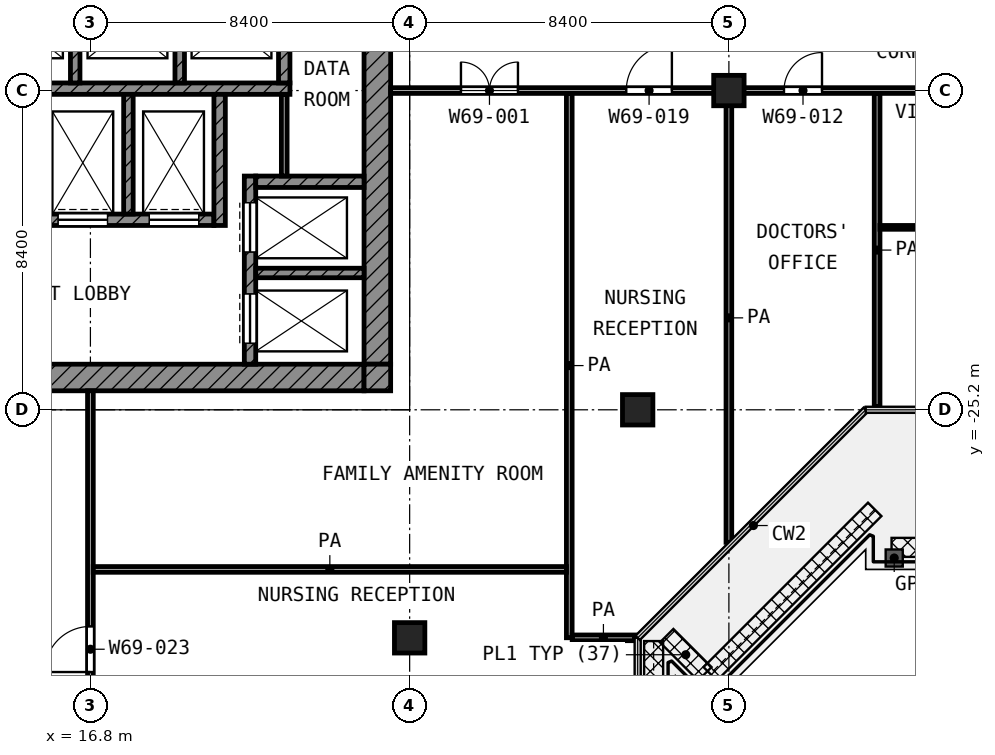
"""IFC4 building model, lengths in metres.
Left out: names, types, materials, properties, quantities, classifications, styles, units other than length and angle.
Written with IfcOpenShell. Run it as: python <this file> out.ifc"""

import sys

from ifc_helpers import new_model, si_unit, direction, frame, frame_2d, origin, origin_2d, place, context, subcontext, project, spatial, rectangle, extrude, element, fill, save


model = new_model("IFC4")
c1 = context("Model", 3, precision=1e-05, world=origin(), true_north=direction((0.0, 1.0)))
c2 = subcontext(c1, "Body", "Model", "MODEL_VIEW")
j1 = project(units=[si_unit("LENGTHUNIT", "METRE"), si_unit("PLANEANGLEUNIT", "RADIAN")], contexts=[c1])
p1 = place(None, origin())
s1 = spatial("IfcSite", under=j1, at=p1, CompositionType="ELEMENT")
p2 = place(p1, origin())
s2 = spatial("IfcBuilding", under=s1, at=p2, CompositionType="ELEMENT")
p3 = place(p2, frame((0.0, 0.0, 319.6)))
s3 = spatial("IfcBuildingStorey", under=s2, at=p3, CompositionType="ELEMENT", Elevation=319.6)
for number, where, z_axis, x_axis in (
    (1, (33.6, -16.8, 0.0), (0.0, 0.0, 1.0), (1.0, 0.0, 0.0)),
    (2, (31.2, -25.2, 0.0), (0.0, 0.0, 1.0), (1.0, 0.0, 0.0)),
    (3, (25.2, -31.2, 0.0), (0.0, 0.0, 1.0), (1.0, 0.0, 0.0)),
):
    element("IfcColumn", number, at=place(p3, frame(where, z_axis=z_axis, x_axis=x_axis)), inside=s3, PredefinedType="COLUMN", context=c2, shape_type="SweptSolid", body=[
        extrude(rectangle(XDim=0.8, YDim=0.8, at=origin_2d()), origin(), (0.0, 0.0, 1.0), 4.2),
    ])
p4 = place(p3, frame((24.35, -24.0, 0.0), z_axis=(0.0, 0.0, 1.0), x_axis=(0.0, 1.0, 0.0)))
e4 = element("IfcWall", 4, at=p4, inside=s3, PredefinedType="SHEAR", context=c2, shape_type="SweptSolid", body=[
    extrude(rectangle(XDim=18.6, YDim=0.7, at=frame_2d((9.3, 0.0))), origin(), (0.0, 0.0, 1.0), 3.6),
])
p5 = place(p4, frame((10.5, 0.0, 0.0)))
e5 = element("IfcOpeningElement", 5, at=p5, cuts=e4, PredefinedType="OPENING", context=c2, shape_type="SweptSolid", body=[
    extrude(rectangle(XDim=1.8, YDim=2.1, at=frame_2d((0.9, 1.05))), frame((0.0, 0.36, 0.0), z_axis=(0.0, -1.0, 0.0), x_axis=(1.0, 0.0, 0.0)), (0.0, 0.0, 1.0), 0.72),
])
p6 = place(p3, frame((5.4, -24.35, 0.0), z_axis=(0.0, 0.0, 1.0), x_axis=(1.0, 0.0, 0.0)))
e6 = element("IfcWall", 6, at=p6, inside=s3, PredefinedType="SHEAR", context=c2, shape_type="SweptSolid", body=[
    extrude(rectangle(XDim=18.6, YDim=0.7, at=frame_2d((9.3, 0.0))), origin(), (0.0, 0.0, 1.0), 3.6),
])
p7 = place(p6, frame((6.3, 0.0, 0.0)))
e7 = element("IfcOpeningElement", 7, at=p7, cuts=e6, PredefinedType="OPENING", context=c2, shape_type="SweptSolid", body=[
    extrude(rectangle(XDim=1.8, YDim=2.1, at=frame_2d((0.9, 1.05))), frame((0.0, 0.36, 0.0), z_axis=(0.0, -1.0, 0.0), x_axis=(1.0, 0.0, 0.0)), (0.0, 0.0, 1.0), 0.72),
])
p8 = place(p3, frame((24.35, -24.7, 0.0), z_axis=(0.0, 0.0, 1.0), x_axis=(0.0, 1.0, 0.0)))
e8 = element("IfcWall", 8, at=p8, inside=s3, PredefinedType="SHEAR", context=c2, shape_type="SweptSolid", body=[
    extrude(rectangle(XDim=0.7, YDim=0.7, at=frame_2d((0.35, 0.0))), origin(), (0.0, 0.0, 1.0), 3.6),
])
p9 = place(p3, frame((5.4, -16.75, 0.0), z_axis=(0.0, 0.0, 1.0), x_axis=(1.0, 0.0, 0.0)))
e9 = element("IfcWall", 9, at=p9, inside=s3, PredefinedType="SHEAR", context=c2, shape_type="SweptSolid", body=[
    extrude(rectangle(XDim=16.65, YDim=0.3, at=frame_2d((8.325, 0.0))), origin(), (0.0, 0.0, 1.0), 3.6),
])
p10 = place(p3, frame((5.4, -20.2, 0.0), z_axis=(0.0, 0.0, 1.0), x_axis=(1.0, 0.0, 0.0)))
e10 = element("IfcWall", 10, at=p10, inside=s3, PredefinedType="SHEAR", context=c2, shape_type="SweptSolid", body=[
    extrude(rectangle(XDim=14.65, YDim=0.3, at=frame_2d((7.325, 0.0))), origin(), (0.0, 0.0, 1.0), 3.6),
])
p11 = place(p10, frame((10.55, 0.0, 0.0)))
e11 = element("IfcOpeningElement", 11, at=p11, cuts=e10, PredefinedType="OPENING", context=c2, shape_type="SweptSolid", body=[
    extrude(rectangle(XDim=1.3, YDim=2.1, at=frame_2d((0.65, 1.05))), frame((0.0, 0.16, 0.0), z_axis=(0.0, -1.0, 0.0), x_axis=(1.0, 0.0, 0.0)), (0.0, 0.0, 1.0), 0.32),
])
p12 = place(p10, frame((12.95, 0.0, 0.0)))
e12 = element("IfcOpeningElement", 12, at=p12, cuts=e10, PredefinedType="OPENING", context=c2, shape_type="SweptSolid", body=[
    extrude(rectangle(XDim=1.3, YDim=2.1, at=frame_2d((0.65, 1.05))), frame((0.0, 0.16, 0.0), z_axis=(0.0, -1.0, 0.0), x_axis=(1.0, 0.0, 0.0)), (0.0, 0.0, 1.0), 0.32),
])
p13 = place(p10, frame((0.55, 0.0, 0.0)))
e13 = element("IfcOpeningElement", 13, at=p13, cuts=e10, PredefinedType="OPENING", context=c2, shape_type="SweptSolid", body=[
    extrude(rectangle(XDim=1.3, YDim=2.1, at=frame_2d((0.65, 1.05))), frame((0.0, 0.16, 0.0), z_axis=(0.0, -1.0, 0.0), x_axis=(1.0, 0.0, 0.0)), (0.0, 0.0, 1.0), 0.32),
])
p14 = place(p10, frame((2.95, 0.0, 0.0)))
e14 = element("IfcOpeningElement", 14, at=p14, cuts=e10, PredefinedType="OPENING", context=c2, shape_type="SweptSolid", body=[
    extrude(rectangle(XDim=1.3, YDim=2.1, at=frame_2d((0.65, 1.05))), frame((0.0, 0.16, 0.0), z_axis=(0.0, -1.0, 0.0), x_axis=(1.0, 0.0, 0.0)), (0.0, 0.0, 1.0), 0.32),
])
p15 = place(p10, frame((5.35, 0.0, 0.0)))
e15 = element("IfcOpeningElement", 15, at=p15, cuts=e10, PredefinedType="OPENING", context=c2, shape_type="SweptSolid", body=[
    extrude(rectangle(XDim=0.9, YDim=2.1, at=frame_2d((0.45, 1.05))), frame((0.0, 0.16, 0.0), z_axis=(0.0, -1.0, 0.0), x_axis=(1.0, 0.0, 0.0)), (0.0, 0.0, 1.0), 0.32),
])
p16 = place(p10, frame((7.75, 0.0, 0.0)))
e16 = element("IfcOpeningElement", 16, at=p16, cuts=e10, PredefinedType="OPENING", context=c2, shape_type="SweptSolid", body=[
    extrude(rectangle(XDim=0.9, YDim=2.1, at=frame_2d((0.45, 1.05))), frame((0.0, 0.16, 0.0), z_axis=(0.0, -1.0, 0.0), x_axis=(1.0, 0.0, 0.0)), (0.0, 0.0, 1.0), 0.32),
])
p17 = place(p3, frame((20.2, -20.35, 0.0), z_axis=(0.0, 0.0, 1.0), x_axis=(0.0, 1.0, 0.0)))
e17 = element("IfcWall", 17, at=p17, inside=s3, PredefinedType="SHEAR", context=c2, shape_type="SweptSolid", body=[
    extrude(rectangle(XDim=3.45, YDim=0.3, at=frame_2d((1.725, 0.0))), origin(), (0.0, 0.0, 1.0), 3.6),
])
p18 = place(p3, frame((21.9, -16.6, 0.0), z_axis=(0.0, 0.0, 1.0), x_axis=(0.0, 1.0, 0.0)))
e18 = element("IfcWall", 18, at=p18, inside=s3, PredefinedType="SHEAR", context=c2, shape_type="SweptSolid", body=[
    extrude(rectangle(XDim=2.35, YDim=0.3, at=frame_2d((1.175, 0.0))), origin(), (0.0, 0.0, 1.0), 3.6),
])
p19 = place(p3, frame((21.15, -19.2, 0.0), z_axis=(0.0, 0.0, 1.0), x_axis=(1.0, 0.0, 0.0)))
e19 = element("IfcWall", 19, at=p19, inside=s3, PredefinedType="SHEAR", context=c2, shape_type="SweptSolid", body=[
    extrude(rectangle(XDim=2.85, YDim=0.3, at=frame_2d((1.425, 0.0))), origin(), (0.0, 0.0, 1.0), 3.6),
])
p20 = place(p3, frame((21.0, -24.0, 0.0), z_axis=(0.0, 0.0, 1.0), x_axis=(0.0, 1.0, 0.0)))
e20 = element("IfcWall", 20, at=p20, inside=s3, PredefinedType="SHEAR", context=c2, shape_type="SweptSolid", body=[
    extrude(rectangle(XDim=4.95, YDim=0.3, at=frame_2d((2.475, 0.0))), origin(), (0.0, 0.0, 1.0), 3.6),
])
p21 = place(p20, frame((2.95, 0.0, 0.0)))
e21 = element("IfcOpeningElement", 21, at=p21, cuts=e20, PredefinedType="OPENING", context=c2, shape_type="SweptSolid", body=[
    extrude(rectangle(XDim=1.3, YDim=2.1, at=frame_2d((0.65, 1.05))), frame((0.0, 0.16, 0.0), z_axis=(0.0, -1.0, 0.0), x_axis=(1.0, 0.0, 0.0)), (0.0, 0.0, 1.0), 0.32),
])
p22 = place(p20, frame((0.55, 0.0, 0.0)))
e22 = element("IfcOpeningElement", 22, at=p22, cuts=e20, PredefinedType="OPENING", context=c2, shape_type="SweptSolid", body=[
    extrude(rectangle(XDim=1.3, YDim=2.1, at=frame_2d((0.65, 1.05))), frame((0.0, 0.16, 0.0), z_axis=(0.0, -1.0, 0.0), x_axis=(1.0, 0.0, 0.0)), (0.0, 0.0, 1.0), 0.32),
])
p23 = place(p3, frame((21.15, -21.6, 0.0), z_axis=(0.0, 0.0, 1.0), x_axis=(1.0, 0.0, 0.0)))
e23 = element("IfcWall", 23, at=p23, inside=s3, PredefinedType="SHEAR", context=c2, shape_type="SweptSolid", body=[
    extrude(rectangle(XDim=2.85, YDim=0.25, at=frame_2d((1.425, 0.0))), origin(), (0.0, 0.0, 1.0), 3.6),
])
p24 = place(p3, frame((17.8, -20.05, 0.0), z_axis=(0.0, 0.0, 1.0), x_axis=(0.0, 1.0, 0.0)))
e24 = element("IfcWall", 24, at=p24, inside=s3, PredefinedType="SHEAR", context=c2, shape_type="SweptSolid", body=[
    extrude(rectangle(XDim=3.15, YDim=0.25, at=frame_2d((1.575, 0.0))), origin(), (0.0, 0.0, 1.0), 3.6),
])
for number, where, z_axis, x_axis in (
    (25, (16.4, -16.6, 0.0), (0.0, 0.0, 1.0), (0.0, 1.0, 0.0)),
    (26, (19.15, -16.6, 0.0), (0.0, 0.0, 1.0), (0.0, 1.0, 0.0)),
):
    element("IfcWall", number, at=place(p3, frame(where, z_axis=z_axis, x_axis=x_axis)), inside=s3, PredefinedType="SHEAR", context=c2, shape_type="SweptSolid", body=[
        extrude(rectangle(XDim=2.35, YDim=0.25, at=frame_2d((1.175, 0.0))), origin(), (0.0, 0.0, 1.0), 3.6),
    ])
p25 = place(p3, frame((21.9, -19.05, 0.0), z_axis=(0.0, 0.0, 1.0), x_axis=(0.0, 1.0, 0.0)))
e27 = element("IfcWall", 27, at=p25, inside=s3, PredefinedType="PARTITIONING", context=c2, shape_type="SweptSolid", body=[
    extrude(rectangle(XDim=2.15, YDim=0.15, at=frame_2d((1.075, 0.0))), origin(), (0.0, 0.0, 1.0), 3.6),
])
p26 = place(p3, frame((37.575, -20.4, 0.0), z_axis=(0.0, 0.0, 1.0), x_axis=(1.0, 0.0, 0.0)))
e28 = element("IfcWall", 28, at=p26, inside=s3, PredefinedType="PARTITIONING", context=c2, shape_type="SweptSolid", body=[
    extrude(rectangle(XDim=8.55, YDim=0.1, at=frame_2d((4.275, 0.0))), origin(), (0.0, 0.0, 1.0), 3.6),
])
p27 = place(p26, frame((4.825, 0.0, 0.0)))
e29 = element("IfcOpeningElement", 29, at=p27, cuts=e28, PredefinedType="OPENING", context=c2, shape_type="SweptSolid", body=[
    extrude(rectangle(XDim=1.0, YDim=2.1, at=frame_2d((0.5, 1.05))), frame((0.0, 0.06, 0.0), z_axis=(0.0, -1.0, 0.0), x_axis=(1.0, 0.0, 0.0)), (0.0, 0.0, 1.0), 0.12),
])
p28 = place(p3, frame((29.477, -31.2, 0.0), z_axis=(0.0, 0.0, 1.0), x_axis=(1.0, 0.0, 0.0)))
e30 = element("IfcWall", 30, at=p28, inside=s3, PredefinedType="PARTITIONING", context=c2, shape_type="SweptSolid", body=[
    extrude(rectangle(XDim=1.643, YDim=0.15, at=frame_2d((0.822, 0.0))), origin(), (0.0, 0.0, 1.0), 3.6),
])
p29 = place(p3, frame((16.875, -29.4, 0.0), z_axis=(0.0, 0.0, 1.0), x_axis=(1.0, 0.0, 0.0)))
e31 = element("IfcWall", 31, at=p29, inside=s3, PredefinedType="PARTITIONING", context=c2, shape_type="SweptSolid", body=[
    extrude(rectangle(XDim=12.45, YDim=0.15, at=frame_2d((6.225, 0.0))), origin(), (0.0, 0.0, 1.0), 3.6),
])
p30 = place(p3, frame((24.7, -16.8, 0.0), z_axis=(0.0, 0.0, 1.0), x_axis=(1.0, 0.0, 0.0)))
e32 = element("IfcWall", 32, at=p30, inside=s3, PredefinedType="PARTITIONING", context=c2, shape_type="SweptSolid", body=[
    extrude(rectangle(XDim=34.02, YDim=0.15, at=frame_2d((17.01, 0.0))), origin(), (0.0, 0.0, 1.0), 3.6),
])
p31 = place(p30, frame((1.85, 0.0, 0.0)))
e33 = element("IfcOpeningElement", 33, at=p31, cuts=e32, PredefinedType="OPENING", context=c2, shape_type="SweptSolid", body=[
    extrude(rectangle(XDim=1.5, YDim=2.1, at=frame_2d((0.75, 1.05))), frame((0.0, 0.085, 0.0), z_axis=(0.0, -1.0, 0.0), x_axis=(1.0, 0.0, 0.0)), (0.0, 0.0, 1.0), 0.17),
])
p32 = place(p30, frame((6.2, 0.0, 0.0)))
e34 = element("IfcOpeningElement", 34, at=p32, cuts=e32, PredefinedType="OPENING", context=c2, shape_type="SweptSolid", body=[
    extrude(rectangle(XDim=1.2, YDim=2.1, at=frame_2d((0.6, 1.05))), frame((0.0, 0.085, 0.0), z_axis=(0.0, -1.0, 0.0), x_axis=(1.0, 0.0, 0.0)), (0.0, 0.0, 1.0), 0.17),
])
p33 = place(p30, frame((10.35, 0.0, 0.0)))
e35 = element("IfcOpeningElement", 35, at=p33, cuts=e32, PredefinedType="OPENING", context=c2, shape_type="SweptSolid", body=[
    extrude(rectangle(XDim=1.0, YDim=2.1, at=frame_2d((0.5, 1.05))), frame((0.0, 0.085, 0.0), z_axis=(0.0, -1.0, 0.0), x_axis=(1.0, 0.0, 0.0)), (0.0, 0.0, 1.0), 0.17),
])
p34 = place(p30, frame((20.0, 0.0, 0.0)))
e36 = element("IfcOpeningElement", 36, at=p34, cuts=e32, PredefinedType="OPENING", context=c2, shape_type="SweptSolid", body=[
    extrude(rectangle(XDim=1.2, YDim=2.1, at=frame_2d((0.6, 1.05))), frame((0.0, 0.085, 0.0), z_axis=(0.0, -1.0, 0.0), x_axis=(1.0, 0.0, 0.0)), (0.0, 0.0, 1.0), 0.17),
])
p35 = place(p30, frame((18.4, 0.0, 0.0)))
e37 = element("IfcOpeningElement", 37, at=p35, cuts=e32, PredefinedType="OPENING", context=c2, shape_type="SweptSolid", body=[
    extrude(rectangle(XDim=1.2, YDim=2.1, at=frame_2d((0.6, 1.05))), frame((0.0, 0.085, 0.0), z_axis=(0.0, -1.0, 0.0), x_axis=(1.0, 0.0, 0.0)), (0.0, 0.0, 1.0), 0.17),
])
p36 = place(p30, frame((23.1, 0.0, 0.0)))
e38 = element("IfcOpeningElement", 38, at=p36, cuts=e32, PredefinedType="OPENING", context=c2, shape_type="SweptSolid", body=[
    extrude(rectangle(XDim=1.0, YDim=2.1, at=frame_2d((0.5, 1.05))), frame((0.0, 0.085, 0.0), z_axis=(0.0, -1.0, 0.0), x_axis=(1.0, 0.0, 0.0)), (0.0, 0.0, 1.0), 0.17),
])
p37 = place(p30, frame((29.15, 0.0, 0.0)))
e39 = element("IfcOpeningElement", 39, at=p37, cuts=e32, PredefinedType="OPENING", context=c2, shape_type="SweptSolid", body=[
    extrude(rectangle(XDim=1.5, YDim=2.1, at=frame_2d((0.75, 1.05))), frame((0.0, 0.085, 0.0), z_axis=(0.0, -1.0, 0.0), x_axis=(1.0, 0.0, 0.0)), (0.0, 0.0, 1.0), 0.17),
])
p38 = place(p3, frame((16.8, -41.92, 0.0), z_axis=(0.0, 0.0, 1.0), x_axis=(0.0, 1.0, 0.0)))
e40 = element("IfcWall", 40, at=p38, inside=s3, PredefinedType="PARTITIONING", context=c2, shape_type="SweptSolid", body=[
    extrude(rectangle(XDim=17.22, YDim=0.15, at=frame_2d((8.61, 0.0))), origin(), (0.0, 0.0, 1.0), 3.6),
])
p39 = place(p38, frame((9.82, 0.0, 0.0)))
e41 = element("IfcOpeningElement", 41, at=p39, cuts=e40, PredefinedType="OPENING", context=c2, shape_type="SweptSolid", body=[
    extrude(rectangle(XDim=1.2, YDim=2.1, at=frame_2d((0.6, 1.05))), frame((0.0, 0.085, 0.0), z_axis=(0.0, -1.0, 0.0), x_axis=(1.0, 0.0, 0.0)), (0.0, 0.0, 1.0), 0.17),
])
p40 = place(p38, frame((5.87, 0.0, 0.0)))
e42 = element("IfcOpeningElement", 42, at=p40, cuts=e40, PredefinedType="OPENING", context=c2, shape_type="SweptSolid", body=[
    extrude(rectangle(XDim=1.0, YDim=2.1, at=frame_2d((0.5, 1.05))), frame((0.0, 0.085, 0.0), z_axis=(0.0, -1.0, 0.0), x_axis=(1.0, 0.0, 0.0)), (0.0, 0.0, 1.0), 0.17),
])
p41 = place(p38, frame((1.67, 0.0, 0.0)))
e43 = element("IfcOpeningElement", 43, at=p41, cuts=e40, PredefinedType="OPENING", context=c2, shape_type="SweptSolid", body=[
    extrude(rectangle(XDim=1.0, YDim=2.1, at=frame_2d((0.5, 1.05))), frame((0.0, 0.085, 0.0), z_axis=(0.0, -1.0, 0.0), x_axis=(1.0, 0.0, 0.0)), (0.0, 0.0, 1.0), 0.17),
])
p42 = place(p3, frame((29.4, -31.198, 0.0), z_axis=(0.0, 0.0, 1.0), x_axis=(0.0, 1.0, 0.0)))
e44 = element("IfcWall", 44, at=p42, inside=s3, PredefinedType="PARTITIONING", context=c2, shape_type="SweptSolid", body=[
    extrude(rectangle(XDim=14.323, YDim=0.15, at=frame_2d((7.162, 0.0))), origin(), (0.0, 0.0, 1.0), 3.6),
])
p43 = place(p3, frame((33.6, -28.687, 0.0), z_axis=(0.0, 0.0, 1.0), x_axis=(0.0, 1.0, 0.0)))
e45 = element("IfcWall", 45, at=p43, inside=s3, PredefinedType="PARTITIONING", context=c2, shape_type="SweptSolid", body=[
    extrude(rectangle(XDim=11.812, YDim=0.15, at=frame_2d((5.906, 0.0))), origin(), (0.0, 0.0, 1.0), 3.6),
])
p44 = place(p3, frame((37.5, -25.12, 0.0), z_axis=(0.0, 0.0, 1.0), x_axis=(0.0, 1.0, 0.0)))
e46 = element("IfcWall", 46, at=p44, inside=s3, PredefinedType="PARTITIONING", context=c2, shape_type="SweptSolid", body=[
    extrude(rectangle(XDim=8.245, YDim=0.15, at=frame_2d((4.123, 0.0))), origin(), (0.0, 0.0, 1.0), 3.6),
])
p45 = place(p21, origin())
e47 = element("IfcDoor", 47, at=p45, inside=s3, OperationType="DOUBLE_DOOR_SLIDING", PredefinedType="DOOR", context=c2, shape_type="SweptSolid", body=[
    extrude(rectangle(XDim=1.3, YDim=2.1, at=frame_2d((0.65, 1.05))), frame((0.0, 0.025, 0.0), z_axis=(0.0, -1.0, 0.0), x_axis=(1.0, 0.0, 0.0)), (0.0, 0.0, 1.0), 0.05),
])
fill(e21, e47)
p46 = place(p22, origin())
e48 = element("IfcDoor", 48, at=p46, inside=s3, OperationType="DOUBLE_DOOR_SLIDING", PredefinedType="DOOR", context=c2, shape_type="SweptSolid", body=[
    extrude(rectangle(XDim=1.3, YDim=2.1, at=frame_2d((0.65, 1.05))), frame((0.0, 0.025, 0.0), z_axis=(0.0, -1.0, 0.0), x_axis=(1.0, 0.0, 0.0)), (0.0, 0.0, 1.0), 0.05),
])
fill(e22, e48)
p47 = place(p11, origin())
e49 = element("IfcDoor", 49, at=p47, inside=s3, OperationType="DOUBLE_DOOR_SLIDING", PredefinedType="DOOR", context=c2, shape_type="SweptSolid", body=[
    extrude(rectangle(XDim=1.3, YDim=2.1, at=frame_2d((0.65, 1.05))), frame((0.0, 0.025, 0.0), z_axis=(0.0, -1.0, 0.0), x_axis=(1.0, 0.0, 0.0)), (0.0, 0.0, 1.0), 0.05),
])
fill(e11, e49)
p48 = place(p12, origin())
e50 = element("IfcDoor", 50, at=p48, inside=s3, OperationType="DOUBLE_DOOR_SLIDING", PredefinedType="DOOR", context=c2, shape_type="SweptSolid", body=[
    extrude(rectangle(XDim=1.3, YDim=2.1, at=frame_2d((0.65, 1.05))), frame((0.0, 0.025, 0.0), z_axis=(0.0, -1.0, 0.0), x_axis=(1.0, 0.0, 0.0)), (0.0, 0.0, 1.0), 0.05),
])
fill(e12, e50)
p49 = place(p31, origin())
e51 = element("IfcDoor", 51, at=p49, inside=s3, OperationType="DOUBLE_DOOR_SINGLE_SWING", PredefinedType="DOOR", context=c2, shape_type="SweptSolid", body=[
    extrude(rectangle(XDim=1.5, YDim=2.1, at=frame_2d((0.75, 1.05))), frame((0.0, 0.025, 0.0), z_axis=(0.0, -1.0, 0.0), x_axis=(1.0, 0.0, 0.0)), (0.0, 0.0, 1.0), 0.05),
])
fill(e33, e51)
p50 = place(p32, origin())
e52 = element("IfcDoor", 52, at=p50, inside=s3, OperationType="SINGLE_SWING_RIGHT", PredefinedType="DOOR", context=c2, shape_type="SweptSolid", body=[
    extrude(rectangle(XDim=1.2, YDim=2.1, at=frame_2d((0.6, 1.05))), frame((0.0, 0.025, 0.0), z_axis=(0.0, -1.0, 0.0), x_axis=(1.0, 0.0, 0.0)), (0.0, 0.0, 1.0), 0.05),
])
fill(e34, e52)
p51 = place(p33, origin())
e53 = element("IfcDoor", 53, at=p51, inside=s3, OperationType="SINGLE_SWING_RIGHT", PredefinedType="DOOR", context=c2, shape_type="SweptSolid", body=[
    extrude(rectangle(XDim=1.0, YDim=2.1, at=frame_2d((0.5, 1.05))), frame((0.0, 0.025, 0.0), z_axis=(0.0, -1.0, 0.0), x_axis=(1.0, 0.0, 0.0)), (0.0, 0.0, 1.0), 0.05),
])
fill(e35, e53)
p52 = place(p39, origin())
e54 = element("IfcDoor", 54, at=p52, inside=s3, OperationType="SINGLE_SWING_LEFT", PredefinedType="DOOR", context=c2, shape_type="SweptSolid", body=[
    extrude(rectangle(XDim=1.2, YDim=2.1, at=frame_2d((0.6, 1.05))), frame((0.0, 0.025, 0.0), z_axis=(0.0, -1.0, 0.0), x_axis=(1.0, 0.0, 0.0)), (0.0, 0.0, 1.0), 0.05),
])
fill(e41, e54)
save(model, sys.argv[1])
